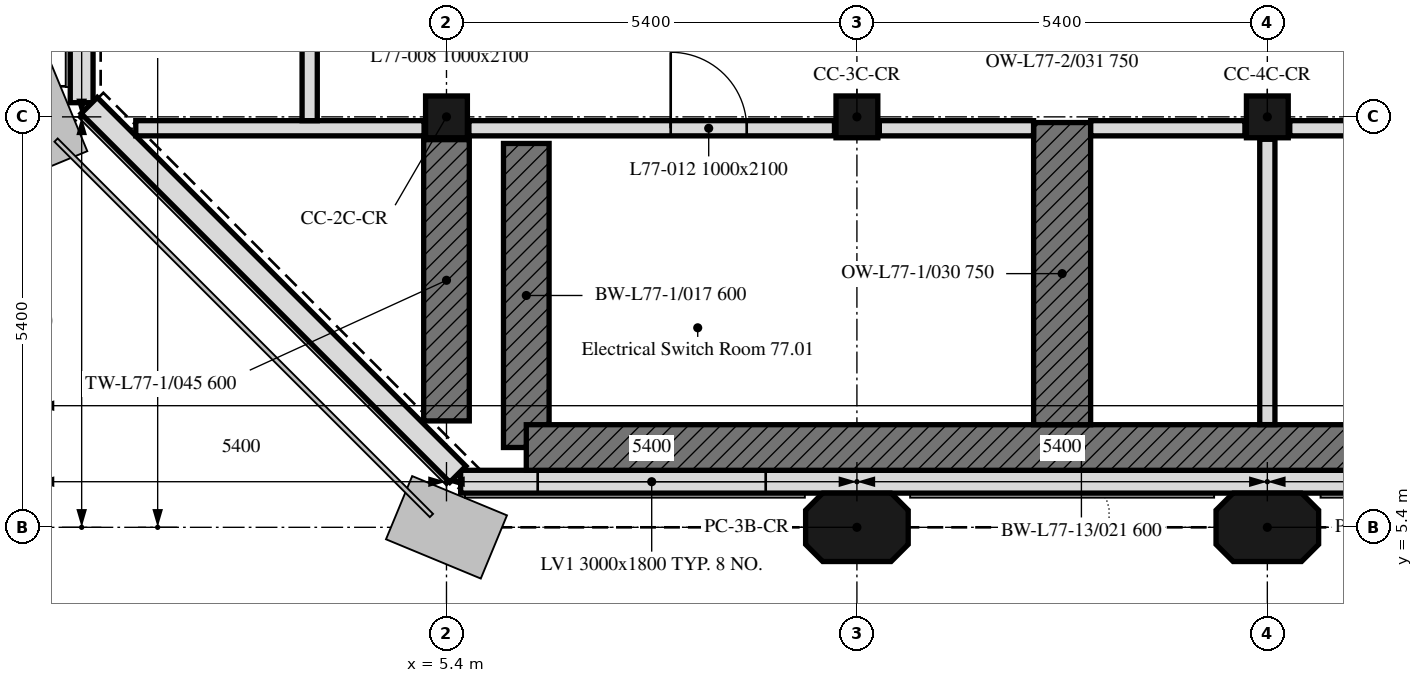
"""IFC4 building model, lengths in metres.
Left out: names, types, materials, properties, quantities, classifications, styles, units other than length and angle.
Written with IfcOpenShell. Run it as: python <this file> out.ifc"""

import sys

from ifc_helpers import new_model, si_unit, direction, frame, frame_2d, origin, origin_2d, place, context, subcontext, project, spatial, polyline, rectangle, outline, extrude, element, fill, save


model = new_model("IFC4")
c1 = context("Model", 3, precision=1e-05, world=origin(), true_north=direction((0.0, 1.0)))
c2 = subcontext(c1, "Body", "Model", "MODEL_VIEW")
j1 = project(units=[si_unit("LENGTHUNIT", "METRE"), si_unit("PLANEANGLEUNIT", "RADIAN")], contexts=[c1])
p1 = place(None, origin())
s1 = spatial("IfcSite", under=j1, at=p1, CompositionType="ELEMENT")
p2 = place(p1, origin())
s2 = spatial("IfcBuilding", under=s1, at=p2, CompositionType="ELEMENT")
p3 = place(p2, frame((0.0, 0.0, 308.2)))
s3 = spatial("IfcBuildingStorey", under=s2, at=p3, CompositionType="ELEMENT", Elevation=308.2)
for number, where, z_axis, x_axis in (
    (1, (10.8, 5.4, 0.0), (0.0, 0.0, 1.0), (1.0, 0.0, 0.0)),
    (2, (16.2, 5.4, 0.0), (0.0, 0.0, 1.0), (1.0, 0.0, 0.0)),
):
    element("IfcColumn", number, at=place(p3, frame(where, z_axis=z_axis, x_axis=x_axis)), inside=s3, PredefinedType="COLUMN", context=c2, shape_type="SweptSolid", body=[
        extrude(outline(polyline([(-0.45, -0.45), (0.45, -0.45), (0.675, -0.225), (0.675, 0.225), (0.45, 0.45), (-0.45, 0.45), (-0.675, 0.225), (-0.675, -0.225), (-0.45, -0.45)])), origin(), (0.0, 0.0, 1.0), 4.2),
    ])
for number, where, z_axis, x_axis in (
    (3, (5.4, 10.8, 0.0), (0.0, 0.0, 1.0), (1.0, 0.0, 0.0)),
    (4, (10.8, 10.8, 0.0), (0.0, 0.0, 1.0), (1.0, 0.0, 0.0)),
    (5, (16.2, 10.8, 0.0), (0.0, 0.0, 1.0), (1.0, 0.0, 0.0)),
):
    element("IfcColumn", number, at=place(p3, frame(where, z_axis=z_axis, x_axis=x_axis)), inside=s3, PredefinedType="COLUMN", context=c2, shape_type="SweptSolid", body=[
        extrude(rectangle(XDim=0.55, YDim=0.55, at=origin_2d()), origin(), (0.0, 0.0, 1.0), 4.2),
    ])
p4 = place(p3, frame((6.45, 6.45, 0.0), z_axis=(0.0, 0.0, 1.0), x_axis=(0.0, 1.0, 0.0)))
e6 = element("IfcWall", 6, at=p4, inside=s3, PredefinedType="SHEAR", context=c2, shape_type="SweptSolid", body=[
    extrude(rectangle(XDim=4.0, YDim=0.6, at=frame_2d((2.0, 0.0))), origin(), (0.0, 0.0, 1.0), 4.2),
])
p5 = place(p3, frame((21.058, 6.45, 0.0), z_axis=(0.0, 0.0, 1.0), x_axis=(-1.0, 0.0, 0.0)))
e7 = element("IfcWall", 7, at=p5, inside=s3, PredefinedType="SHEAR", context=c2, shape_type="SweptSolid", body=[
    extrude(rectangle(XDim=14.608, YDim=0.6, at=frame_2d((7.304, 0.0))), origin(), (0.0, 0.0, 1.0), 4.2),
])
p6 = place(p3, frame((13.5, 6.75, 0.0), z_axis=(0.0, 0.0, 1.0), x_axis=(0.0, 1.0, 0.0)))
e8 = element("IfcWall", 8, at=p6, inside=s3, PredefinedType="SHEAR", context=c2, shape_type="SweptSolid", body=[
    extrude(rectangle(XDim=3.975, YDim=0.75, at=frame_2d((1.988, 0.0))), origin(), (0.0, 0.0, 1.0), 4.2),
])
p7 = place(p3, frame((5.4, 6.8, 0.0), z_axis=(0.0, 0.0, 1.0), x_axis=(0.0, 1.0, 0.0)))
e9 = element("IfcWall", 9, at=p7, inside=s3, PredefinedType="SHEAR", context=c2, shape_type="SweptSolid", body=[
    extrude(rectangle(XDim=3.7, YDim=0.6, at=frame_2d((1.85, 0.0))), origin(), (0.0, 0.0, 1.0), 4.2),
])
p8 = place(p3, frame((5.586, 6.0, 0.0), z_axis=(0.0, 0.0, 1.0), x_axis=(1.0, 0.0, 0.0)))
e10 = element("IfcWall", 10, at=p8, inside=s3, PredefinedType="SOLIDWALL", context=c2, shape_type="SweptSolid", body=[
    extrude(outline(polyline([(0.0, 0.0), (32.027, 0.0), (32.027, 4.2), (31.434, 4.2), (30.841, 4.2), (30.248, 4.2), (29.655, 4.2), (29.062, 4.2), (28.469, 4.2), (27.875, 4.2), (27.282, 4.2), (26.689, 4.2), (26.096, 4.2), (25.503, 4.2), (24.91, 4.2), (24.317, 4.2), (23.724, 4.2), (23.131, 4.2), (22.538, 4.2), (21.945, 4.2), (21.352, 4.2), (20.758, 4.2), (20.165, 4.2), (19.572, 4.2), (18.979, 4.2), (18.386, 4.2), (17.793, 4.2), (17.2, 4.2), (16.607, 4.2), (16.014, 4.2), (15.42, 4.2), (14.827, 4.2), (14.234, 4.2), (13.641, 4.2), (13.048, 4.2), (12.455, 4.2), (11.862, 4.2), (11.269, 4.2), (10.676, 4.2), (10.083, 4.2), (9.49, 4.2), (8.896, 4.2), (8.303, 4.2), (7.71, 4.2), (7.117, 4.2), (6.524, 4.2), (5.931, 4.2), (5.338, 4.2), (4.745, 4.2), (4.152, 4.2), (3.559, 4.2), (2.966, 4.2), (2.372, 4.2), (1.779, 4.2), (1.186, 4.2), (0.593, 4.2), (0.0, 4.2), (0.0, 0.0)])), frame((0.0, 0.15, 0.0), z_axis=(0.0, -1.0, 0.0), x_axis=(1.0, 0.0, 0.0)), (0.0, 0.0, 1.0), 0.3),
])
p9 = place(p8, frame((1.014, 0.0, 0.6)))
e11 = element("IfcOpeningElement", 11, at=p9, cuts=e10, PredefinedType="OPENING", context=c2, shape_type="SweptSolid", body=[
    extrude(rectangle(XDim=3.0, YDim=1.8, at=frame_2d((1.5, 0.9))), frame((0.0, 0.16, 0.0), z_axis=(0.0, -1.0, 0.0), x_axis=(1.0, 0.0, 0.0)), (0.0, 0.0, 1.0), 0.32),
])
p10 = place(p3, frame((0.6, 43.014, 0.0), z_axis=(0.0, 0.0, 1.0), x_axis=(0.0, -1.0, 0.0)))
e12 = element("IfcWall", 12, at=p10, inside=s3, PredefinedType="SOLIDWALL", context=c2, shape_type="SweptSolid", body=[
    extrude(outline(polyline([(0.0, 0.0), (32.027, 0.0), (32.027, 4.2), (31.434, 4.2), (30.841, 4.2), (30.248, 4.2), (29.655, 4.2), (29.062, 4.2), (28.469, 4.2), (27.875, 4.2), (27.282, 4.2), (26.689, 4.2), (26.096, 4.2), (25.503, 4.2), (24.91, 4.2), (24.317, 4.2), (23.724, 4.2), (23.131, 4.2), (22.538, 4.2), (21.945, 4.2), (21.352, 4.2), (20.758, 4.2), (20.165, 4.2), (19.572, 4.2), (18.979, 4.2), (18.386, 4.2), (17.793, 4.2), (17.2, 4.2), (16.607, 4.2), (16.014, 4.2), (15.42, 4.2), (14.827, 4.2), (14.234, 4.2), (13.641, 4.2), (13.048, 4.2), (12.455, 4.2), (11.862, 4.2), (11.269, 4.2), (10.676, 4.2), (10.083, 4.2), (9.49, 4.2), (8.896, 4.2), (8.303, 4.2), (7.71, 4.2), (7.117, 4.2), (6.524, 4.2), (5.931, 4.2), (5.338, 4.2), (4.745, 4.2), (4.152, 4.2), (3.559, 4.2), (2.966, 4.2), (2.372, 4.2), (1.779, 4.2), (1.186, 4.2), (0.593, 4.2), (0.0, 4.2), (0.0, 0.0)])), frame((0.0, 0.15, 0.0), z_axis=(0.0, -1.0, 0.0), x_axis=(1.0, 0.0, 0.0)), (0.0, 0.0, 1.0), 0.3),
])
p11 = place(p10, frame((1.014, 0.0, 0.6)))
e13 = element("IfcOpeningElement", 13, at=p11, cuts=e12, PredefinedType="OPENING", context=c2, shape_type="SweptSolid", body=[
    extrude(rectangle(XDim=3.0, YDim=1.8, at=frame_2d((1.5, 0.9))), frame((0.0, 0.16, 0.0), z_axis=(0.0, -1.0, 0.0), x_axis=(1.0, 0.0, 0.0)), (0.0, 0.0, 1.0), 0.32),
])
p12 = place(p10, frame((7.089, 0.0, 0.6)))
e14 = element("IfcOpeningElement", 14, at=p12, cuts=e12, PredefinedType="OPENING", context=c2, shape_type="SweptSolid", body=[
    extrude(rectangle(XDim=1.65, YDim=1.8, at=frame_2d((0.825, 0.9))), frame((0.0, 0.16, 0.0), z_axis=(0.0, -1.0, 0.0), x_axis=(1.0, 0.0, 0.0)), (0.0, 0.0, 1.0), 0.32),
])
p13 = place(p10, frame((12.489, 0.0, 0.6)))
e15 = element("IfcOpeningElement", 15, at=p13, cuts=e12, PredefinedType="OPENING", context=c2, shape_type="SweptSolid", body=[
    extrude(rectangle(XDim=1.65, YDim=1.8, at=frame_2d((0.825, 0.9))), frame((0.0, 0.16, 0.0), z_axis=(0.0, -1.0, 0.0), x_axis=(1.0, 0.0, 0.0)), (0.0, 0.0, 1.0), 0.32),
])
p14 = place(p10, frame((17.889, 0.0, 0.6)))
e16 = element("IfcOpeningElement", 16, at=p14, cuts=e12, PredefinedType="OPENING", context=c2, shape_type="SweptSolid", body=[
    extrude(rectangle(XDim=1.65, YDim=1.8, at=frame_2d((0.825, 0.9))), frame((0.0, 0.16, 0.0), z_axis=(0.0, -1.0, 0.0), x_axis=(1.0, 0.0, 0.0)), (0.0, 0.0, 1.0), 0.32),
])
p15 = place(p10, frame((23.289, 0.0, 0.6)))
e17 = element("IfcOpeningElement", 17, at=p15, cuts=e12, PredefinedType="OPENING", context=c2, shape_type="SweptSolid", body=[
    extrude(rectangle(XDim=1.65, YDim=1.8, at=frame_2d((0.825, 0.9))), frame((0.0, 0.16, 0.0), z_axis=(0.0, -1.0, 0.0), x_axis=(1.0, 0.0, 0.0)), (0.0, 0.0, 1.0), 0.32),
])
p16 = place(p10, frame((28.014, 0.0, 0.6)))
e18 = element("IfcOpeningElement", 18, at=p16, cuts=e12, PredefinedType="OPENING", context=c2, shape_type="SweptSolid", body=[
    extrude(rectangle(XDim=3.0, YDim=1.8, at=frame_2d((1.5, 0.9))), frame((0.0, 0.16, 0.0), z_axis=(0.0, -1.0, 0.0), x_axis=(1.0, 0.0, 0.0)), (0.0, 0.0, 1.0), 0.32),
])
p17 = place(p3, frame((0.699, 10.949, 0.0), z_axis=(0.0, 0.0, 1.0), x_axis=(0.707106781187, -0.707106781187, 0.0)))
e19 = element("IfcWall", 19, at=p17, inside=s3, PredefinedType="SOLIDWALL", context=c2, shape_type="SweptSolid", body=[
    extrude(outline(polyline([(0.0, 0.0), (6.86, 0.0), (6.86, 4.2), (6.288, 4.2), (5.716, 4.2), (5.145, 4.2), (4.573, 4.2), (4.001, 4.2), (3.43, 4.2), (2.858, 4.2), (2.287, 4.2), (1.715, 4.2), (1.143, 4.2), (0.572, 4.2), (0.0, 4.2), (0.0, 0.0)])), frame((0.0, 0.15, 0.0), z_axis=(0.0, -1.0, 0.0), x_axis=(1.0, 0.0, 0.0)), (0.0, 0.0, 1.0), 0.3),
])
p18 = place(p3, frame((16.2, 6.751, 0.0), z_axis=(0.0, 0.0, 1.0), x_axis=(0.0, 1.0, 0.0)))
e20 = element("IfcWall", 20, at=p18, inside=s3, PredefinedType="PARTITIONING", context=c2, shape_type="SweptSolid", body=[
    extrude(rectangle(XDim=3.754, YDim=0.2, at=frame_2d((1.877, 0.0))), origin(), (0.0, 0.0, 1.0), 4.2),
])
p19 = place(p3, frame((16.495, 10.65, 0.0), z_axis=(0.0, 0.0, 1.0), x_axis=(1.0, 0.0, 0.0)))
e21 = element("IfcWall", 21, at=p19, inside=s3, PredefinedType="PARTITIONING", context=c2, shape_type="SweptSolid", body=[
    extrude(rectangle(XDim=4.81, YDim=0.2, at=frame_2d((2.405, 0.0))), origin(), (0.0, 0.0, 1.0), 4.2),
])
p20 = place(p19, frame((1.905, 0.0, 0.0)))
e22 = element("IfcOpeningElement", 22, at=p20, cuts=e21, PredefinedType="OPENING", context=c2, shape_type="SweptSolid", body=[
    extrude(rectangle(XDim=1.0, YDim=2.1, at=frame_2d((0.5, 1.05))), frame((0.0, 0.1, 0.0), z_axis=(0.0, -1.0, 0.0), x_axis=(1.0, 0.0, 0.0)), (0.0, 0.0, 1.0), 0.2),
])
p21 = place(p3, frame((1.312, 10.65, 0.0), z_axis=(0.0, 0.0, 1.0), x_axis=(1.0, 0.0, 0.0)))
e23 = element("IfcWall", 23, at=p21, inside=s3, PredefinedType="PARTITIONING", context=c2, shape_type="SweptSolid", body=[
    extrude(rectangle(XDim=3.793, YDim=0.2, at=frame_2d((1.896, 0.0))), origin(), (0.0, 0.0, 1.0), 4.2),
])
p22 = place(p3, frame((5.695, 10.65, 0.0), z_axis=(0.0, 0.0, 1.0), x_axis=(1.0, 0.0, 0.0)))
e24 = element("IfcWall", 24, at=p22, inside=s3, PredefinedType="PARTITIONING", context=c2, shape_type="SweptSolid", body=[
    extrude(rectangle(XDim=4.81, YDim=0.2, at=frame_2d((2.405, 0.0))), origin(), (0.0, 0.0, 1.0), 4.2),
])
p23 = place(p22, frame((2.655, 0.0, 0.0)))
e25 = element("IfcOpeningElement", 25, at=p23, cuts=e24, PredefinedType="OPENING", context=c2, shape_type="SweptSolid", body=[
    extrude(rectangle(XDim=1.0, YDim=2.1, at=frame_2d((0.5, 1.05))), frame((0.0, 0.1, 0.0), z_axis=(0.0, -1.0, 0.0), x_axis=(1.0, 0.0, 0.0)), (0.0, 0.0, 1.0), 0.2),
])
for number, where, z_axis, x_axis in (
    (26, (11.095, 10.65, 0.0), (0.0, 0.0, 1.0), (1.0, 0.0, 0.0)),
    (27, (13.876, 10.65, 0.0), (0.0, 0.0, 1.0), (1.0, 0.0, 0.0)),
):
    element("IfcWall", number, at=place(p3, frame(where, z_axis=z_axis, x_axis=x_axis)), inside=s3, PredefinedType="PARTITIONING", context=c2, shape_type="SweptSolid", body=[
        extrude(rectangle(XDim=2.029, YDim=0.2, at=frame_2d((1.015, 0.0))), origin(), (0.0, 0.0, 1.0), 4.2),
    ])
p24 = place(p3, frame((3.6, 10.75, 0.0), z_axis=(0.0, 0.0, 1.0), x_axis=(0.0, 1.0, 0.0)))
e28 = element("IfcWall", 28, at=p24, inside=s3, PredefinedType="PARTITIONING", context=c2, shape_type="SweptSolid", body=[
    extrude(rectangle(XDim=16.15, YDim=0.2, at=frame_2d((8.075, 0.0))), origin(), (0.0, 0.0, 1.0), 3.45),
])
p25 = place(p24, frame((2.175, 0.0, 0.0)))
e29 = element("IfcOpeningElement", 29, at=p25, cuts=e28, PredefinedType="OPENING", context=c2, shape_type="SweptSolid", body=[
    extrude(rectangle(XDim=1.0, YDim=2.1, at=frame_2d((0.5, 1.05))), frame((0.0, 0.1, 0.0), z_axis=(0.0, -1.0, 0.0), x_axis=(1.0, 0.0, 0.0)), (0.0, 0.0, 1.0), 0.2),
])
p26 = place(p24, frame((10.35, 0.0, 0.0)))
e30 = element("IfcOpeningElement", 30, at=p26, cuts=e28, PredefinedType="OPENING", context=c2, shape_type="SweptSolid", body=[
    extrude(rectangle(XDim=1.0, YDim=2.1, at=frame_2d((0.5, 1.05))), frame((0.0, 0.1, 0.0), z_axis=(0.0, -1.0, 0.0), x_axis=(1.0, 0.0, 0.0)), (0.0, 0.0, 1.0), 0.2),
])
p27 = place(p9, origin())
e31 = element("IfcWindow", 31, at=p27, inside=s3, PartitioningType="SINGLE_PANEL", PredefinedType="WINDOW", context=c2, shape_type="SweptSolid", body=[
    extrude(rectangle(XDim=3.0, YDim=1.8, at=frame_2d((1.5, 0.9))), frame((0.0, 0.03, 0.0), z_axis=(0.0, -1.0, 0.0), x_axis=(1.0, 0.0, 0.0)), (0.0, 0.0, 1.0), 0.06),
])
fill(e11, e31)
p28 = place(p23, origin())
e32 = element("IfcDoor", 32, at=p28, inside=s3, OperationType="SINGLE_SWING_RIGHT", PredefinedType="DOOR", context=c2, shape_type="SweptSolid", body=[
    extrude(rectangle(XDim=1.0, YDim=2.1, at=frame_2d((0.5, 1.05))), frame((0.0, 0.025, 0.0), z_axis=(0.0, -1.0, 0.0), x_axis=(1.0, 0.0, 0.0)), (0.0, 0.0, 1.0), 0.05),
])
fill(e25, e32)
save(model, sys.argv[1])
